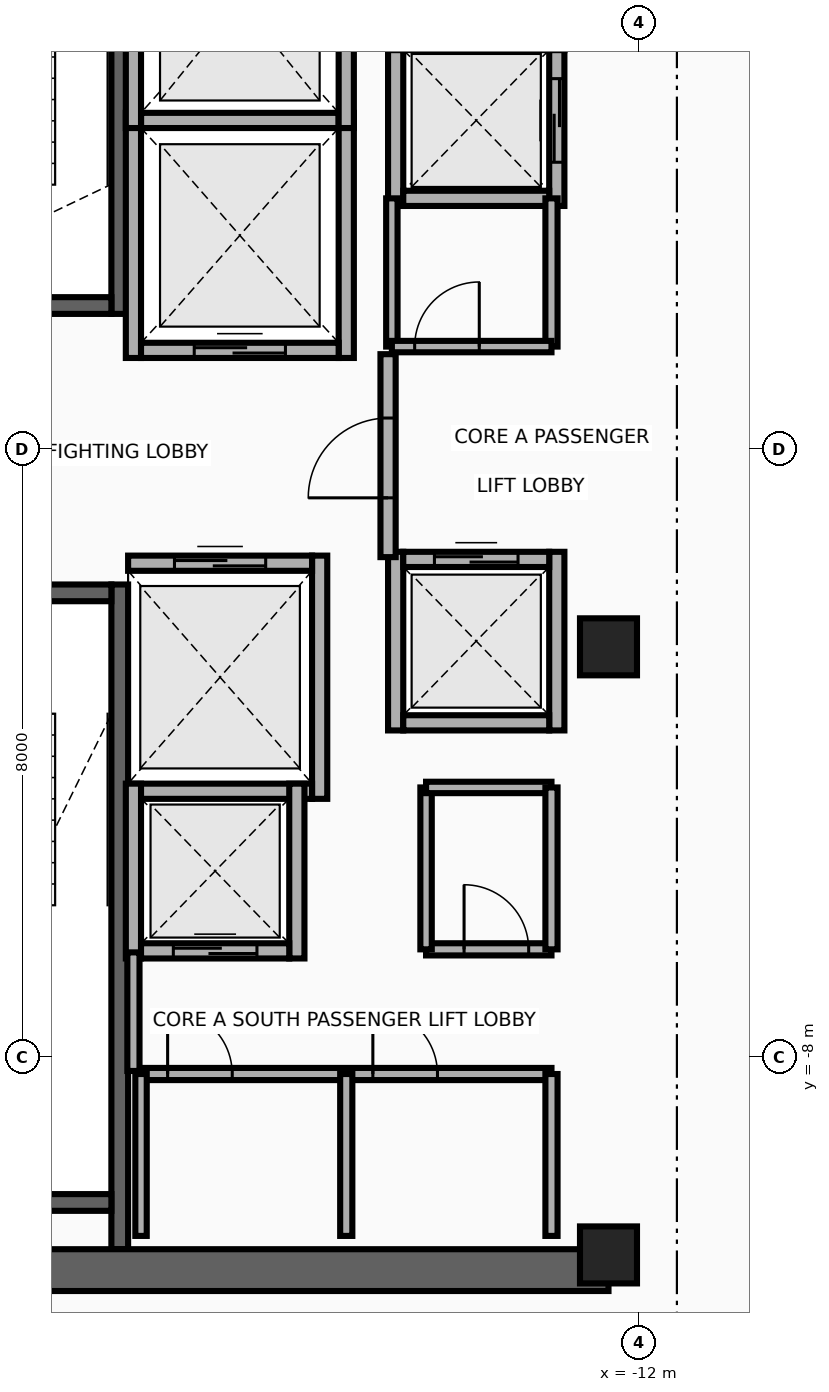
"""IFC4 building model, lengths in metres.
Left out: names, types, materials, properties, quantities, classifications, styles, units other than length and angle.
Written with IfcOpenShell. Run it as: python <this file> out.ifc"""

import sys

from ifc_helpers import new_model, si_unit, direction, frame, frame_2d, origin, origin_2d, place, context, subcontext, project, spatial, rectangle, extrude, source, transform, mapped, element, fill, save


model = new_model("IFC4")
c1 = context("Model", 3, precision=1e-05, world=origin(), true_north=direction((0.0, 1.0)))
c2 = subcontext(c1, "Body", "Model", "MODEL_VIEW")
j1 = project(units=[si_unit("LENGTHUNIT", "METRE"), si_unit("PLANEANGLEUNIT", "RADIAN")], contexts=[c1])
p1 = place(None, origin())
s1 = spatial("IfcSite", under=j1, at=p1, CompositionType="ELEMENT")
p2 = place(p1, origin())
s2 = spatial("IfcBuilding", under=s1, at=p2, CompositionType="ELEMENT")
p3 = place(p2, frame((0.0, 0.0, 287.0)))
s3 = spatial("IfcBuildingStorey", under=s2, at=p3, CompositionType="ELEMENT", Elevation=287.0)
p4 = place(p3, frame((-18.83, 1.78, 0.0), z_axis=(0.0, 0.0, 1.0), x_axis=(0.0, 1.0, 0.0)))
e1 = element("IfcWall", 1, at=p4, inside=s3, PredefinedType="SHEAR", context=c2, shape_type="SweptSolid", body=[
    extrude(rectangle(XDim=8.745, YDim=0.22, at=frame_2d((4.373, 0.0))), origin(), (0.0, 0.0, 1.0), 3.36),
])
p5 = place(p3, frame((-22.05, 1.89, 0.0), z_axis=(0.0, 0.0, 1.0), x_axis=(1.0, 0.0, 0.0)))
e2 = element("IfcWall", 2, at=p5, inside=s3, PredefinedType="SHEAR", context=c2, shape_type="SweptSolid", body=[
    extrude(rectangle(XDim=3.11, YDim=0.22, at=frame_2d((1.555, 0.0))), origin(), (0.0, 0.0, 1.0), 3.36),
])
p6 = place(p5, frame((1.0, 0.0, 0.0)))
e3 = element("IfcOpeningElement", 3, at=p6, cuts=e2, PredefinedType="OPENING", context=c2, shape_type="SweptSolid", body=[
    extrude(rectangle(XDim=1.1, YDim=2.15, at=frame_2d((0.55, 1.075))), frame((0.0, 0.125, 0.0), z_axis=(0.0, -1.0, 0.0), x_axis=(1.0, 0.0, 0.0)), (0.0, 0.0, 1.0), 0.25),
])
p7 = place(p3, frame((-18.83, -10.525, 0.0), z_axis=(0.0, 0.0, 1.0), x_axis=(0.0, 1.0, 0.0)))
e4 = element("IfcWall", 4, at=p7, inside=s3, PredefinedType="SHEAR", context=c2, shape_type="SweptSolid", body=[
    extrude(rectangle(XDim=8.745, YDim=0.22, at=frame_2d((4.373, 0.0))), origin(), (0.0, 0.0, 1.0), 3.36),
])
p8 = place(p3, frame((-22.05, -9.91, 0.0), z_axis=(0.0, 0.0, 1.0), x_axis=(1.0, 0.0, 0.0)))
e5 = element("IfcWall", 5, at=p8, inside=s3, PredefinedType="SHEAR", context=c2, shape_type="SweptSolid", body=[
    extrude(rectangle(XDim=3.11, YDim=0.22, at=frame_2d((1.555, 0.0))), origin(), (0.0, 0.0, 1.0), 3.36),
])
p9 = place(p3, frame((-22.05, -1.89, 0.0), z_axis=(0.0, 0.0, 1.0), x_axis=(1.0, 0.0, 0.0)))
e6 = element("IfcWall", 6, at=p9, inside=s3, PredefinedType="SHEAR", context=c2, shape_type="SweptSolid", body=[
    extrude(rectangle(XDim=3.11, YDim=0.22, at=frame_2d((1.555, 0.0))), origin(), (0.0, 0.0, 1.0), 3.36),
])
p10 = place(p9, frame((1.0, 0.0, 0.0)))
e7 = element("IfcOpeningElement", 7, at=p10, cuts=e6, PredefinedType="OPENING", context=c2, shape_type="SweptSolid", body=[
    extrude(rectangle(XDim=1.1, YDim=2.15, at=frame_2d((0.55, 1.075))), frame((0.0, 0.125, 0.0), z_axis=(0.0, -1.0, 0.0), x_axis=(1.0, 0.0, 0.0)), (0.0, 0.0, 1.0), 0.25),
])
p11 = place(p3, frame((-22.65, -10.8, 0.0), z_axis=(0.0, 0.0, 1.0), x_axis=(1.0, 0.0, 0.0)))
e8 = element("IfcWall", 8, at=p11, inside=s3, PredefinedType="SHEAR", context=c2, shape_type="SweptSolid", body=[
    extrude(rectangle(XDim=10.25, YDim=0.55, at=frame_2d((5.125, 0.0))), origin(), (0.0, 0.0, 1.0), 3.36),
])
m1 = source(origin(), c2, "Body", "SweptSolid", [
    extrude(rectangle(XDim=0.75, YDim=0.75, at=origin_2d()), origin(), (0.0, 0.0, 1.0), 3.6),
])
for number, where, z_axis, x_axis in (
    (9, (-12.4, -10.6, 0.0), (0.0, 0.0, 1.0), (1.0, 0.0, 0.0)),
    (10, (-12.4, -2.6, 0.0), (0.0, 0.0, 1.0), (1.0, 0.0, 0.0)),
):
    element("IfcColumn", number, at=place(p3, frame(where, z_axis=z_axis, x_axis=x_axis)), inside=s3, PredefinedType="COLUMN", context=c2, shape_type="MappedRepresentation", body=[
        mapped(m1, transform((0.0, 0.0, 0.0), x_axis=(1.0, 0.0, 0.0), y_axis=(0.0, 1.0, 0.0), z_axis=(0.0, 0.0, 1.0), scale=1.0)),
    ])
for number, where, z_axis, x_axis in (
    (11, (-18.65, 1.2, 0.0), (0.0, 0.0, 1.0), (0.0, 1.0, 0.0)),
    (12, (-15.85, 1.2, 0.0), (0.0, 0.0, 1.0), (0.0, 1.0, 0.0)),
):
    element("IfcWall", number, at=place(p3, frame(where, z_axis=z_axis, x_axis=x_axis)), inside=s3, PredefinedType="MOVABLE", context=c2, shape_type="SweptSolid", body=[
        extrude(rectangle(XDim=3.225, YDim=0.2, at=frame_2d((1.613, 0.0))), origin(), (0.0, 0.0, 1.0), 3.36),
    ])
p12 = place(p3, frame((-18.55, 1.3, 0.0), z_axis=(0.0, 0.0, 1.0), x_axis=(1.0, 0.0, 0.0)))
e13 = element("IfcWall", 13, at=p12, inside=s3, PredefinedType="MOVABLE", context=c2, shape_type="SweptSolid", body=[
    extrude(rectangle(XDim=2.6, YDim=0.2, at=frame_2d((1.3, 0.0))), origin(), (0.0, 0.0, 1.0), 3.36),
])
p13 = place(p12, frame((0.7, 0.0, 0.0)))
e14 = element("IfcOpeningElement", 14, at=p13, cuts=e13, PredefinedType="OPENING", context=c2, shape_type="SweptSolid", body=[
    extrude(rectangle(XDim=1.2, YDim=2.1, at=frame_2d((0.6, 1.05))), frame((0.0, 0.115, 0.0), z_axis=(0.0, -1.0, 0.0), x_axis=(1.0, 0.0, 0.0)), (0.0, 0.0, 1.0), 0.23),
])
p14 = place(p3, frame((-18.55, 4.325, 0.0), z_axis=(0.0, 0.0, 1.0), x_axis=(1.0, 0.0, 0.0)))
e15 = element("IfcWall", 15, at=p14, inside=s3, PredefinedType="MOVABLE", context=c2, shape_type="SweptSolid", body=[
    extrude(rectangle(XDim=2.6, YDim=0.2, at=frame_2d((1.3, 0.0))), origin(), (0.0, 0.0, 1.0), 3.36),
])
p15 = place(p3, frame((-16.2, -4.6, 0.0), z_axis=(0.0, 0.0, 1.0), x_axis=(0.0, 1.0, 0.0)))
e16 = element("IfcWall", 16, at=p15, inside=s3, PredefinedType="MOVABLE", context=c2, shape_type="SweptSolid", body=[
    extrude(rectangle(XDim=3.2, YDim=0.2, at=frame_2d((1.6, 0.0))), origin(), (0.0, 0.0, 1.0), 3.36),
])
p16 = place(p3, frame((-18.72, -4.5, 0.0), z_axis=(0.0, 0.0, 1.0), x_axis=(1.0, 0.0, 0.0)))
e17 = element("IfcWall", 17, at=p16, inside=s3, PredefinedType="MOVABLE", context=c2, shape_type="SweptSolid", body=[
    extrude(rectangle(XDim=2.42, YDim=0.2, at=frame_2d((1.21, 0.0))), origin(), (0.0, 0.0, 1.0), 3.36),
])
p17 = place(p3, frame((-18.72, -1.5, 0.0), z_axis=(0.0, 0.0, 1.0), x_axis=(1.0, 0.0, 0.0)))
e18 = element("IfcWall", 18, at=p17, inside=s3, PredefinedType="MOVABLE", context=c2, shape_type="SweptSolid", body=[
    extrude(rectangle(XDim=2.42, YDim=0.2, at=frame_2d((1.21, 0.0))), origin(), (0.0, 0.0, 1.0), 3.36),
])
p18 = place(p17, frame((0.61, 0.0, 0.0)))
e19 = element("IfcOpeningElement", 19, at=p18, cuts=e18, PredefinedType="OPENING", context=c2, shape_type="SweptSolid", body=[
    extrude(rectangle(XDim=1.2, YDim=2.1, at=frame_2d((0.6, 1.05))), frame((0.0, 0.115, 0.0), z_axis=(0.0, -1.0, 0.0), x_axis=(1.0, 0.0, 0.0)), (0.0, 0.0, 1.0), 0.23),
])
for number, where, z_axis, x_axis in (
    (20, (-18.65, 4.225, 0.0), (0.0, 0.0, 1.0), (0.0, 1.0, 0.0)),
    (21, (-15.85, 4.225, 0.0), (0.0, 0.0, 1.0), (0.0, 1.0, 0.0)),
):
    element("IfcWall", number, at=place(p3, frame(where, z_axis=z_axis, x_axis=x_axis)), inside=s3, PredefinedType="MOVABLE", context=c2, shape_type="SweptSolid", body=[
        extrude(rectangle(XDim=3.325, YDim=0.2, at=frame_2d((1.663, 0.0))), origin(), (0.0, 0.0, 1.0), 3.36),
    ])
p19 = place(p3, frame((-15.2, 3.2, 0.0), z_axis=(0.0, 0.0, 1.0), x_axis=(0.0, 1.0, 0.0)))
e22 = element("IfcWall", 22, at=p19, inside=s3, PredefinedType="MOVABLE", context=c2, shape_type="SweptSolid", body=[
    extrude(rectangle(XDim=2.25, YDim=0.2, at=frame_2d((1.125, 0.0))), origin(), (0.0, 0.0, 1.0), 3.36),
])
p20 = place(p3, frame((-13.08, 3.2, 0.0), z_axis=(0.0, 0.0, 1.0), x_axis=(0.0, 1.0, 0.0)))
e23 = element("IfcWall", 23, at=p20, inside=s3, PredefinedType="MOVABLE", context=c2, shape_type="SweptSolid", body=[
    extrude(rectangle(XDim=2.25, YDim=0.2, at=frame_2d((1.125, 0.0))), origin(), (0.0, 0.0, 1.0), 3.36),
])
p21 = place(p20, frame((0.575, 0.0, 0.0)))
e24 = element("IfcOpeningElement", 24, at=p21, cuts=e23, PredefinedType="OPENING", context=c2, shape_type="SweptSolid", body=[
    extrude(rectangle(XDim=1.1, YDim=2.1, at=frame_2d((0.55, 1.05))), frame((0.0, 0.115, 0.0), z_axis=(0.0, -1.0, 0.0), x_axis=(1.0, 0.0, 0.0)), (0.0, 0.0, 1.0), 0.23),
])
p22 = place(p3, frame((-15.1, 3.3, 0.0), z_axis=(0.0, 0.0, 1.0), x_axis=(1.0, 0.0, 0.0)))
e25 = element("IfcWall", 25, at=p22, inside=s3, PredefinedType="MOVABLE", context=c2, shape_type="SweptSolid", body=[
    extrude(rectangle(XDim=1.92, YDim=0.2, at=frame_2d((0.96, 0.0))), origin(), (0.0, 0.0, 1.0), 3.36),
])
for number, where, z_axis, x_axis in (
    (26, (-18.65, -6.7, 0.0), (0.0, 0.0, 1.0), (0.0, 1.0, 0.0)),
    (27, (-16.5, -6.7, 0.0), (0.0, 0.0, 1.0), (0.0, 1.0, 0.0)),
):
    element("IfcWall", number, at=place(p3, frame(where, z_axis=z_axis, x_axis=x_axis)), inside=s3, PredefinedType="MOVABLE", context=c2, shape_type="SweptSolid", body=[
        extrude(rectangle(XDim=2.3, YDim=0.2, at=frame_2d((1.15, 0.0))), origin(), (0.0, 0.0, 1.0), 3.36),
    ])
p23 = place(p3, frame((-18.55, -6.6, 0.0), z_axis=(0.0, 0.0, 1.0), x_axis=(1.0, 0.0, 0.0)))
e28 = element("IfcWall", 28, at=p23, inside=s3, PredefinedType="MOVABLE", context=c2, shape_type="SweptSolid", body=[
    extrude(rectangle(XDim=1.95, YDim=0.2, at=frame_2d((0.975, 0.0))), origin(), (0.0, 0.0, 1.0), 3.36),
])
p24 = place(p23, frame((0.425, 0.0, 0.0)))
e29 = element("IfcOpeningElement", 29, at=p24, cuts=e28, PredefinedType="OPENING", context=c2, shape_type="SweptSolid", body=[
    extrude(rectangle(XDim=1.1, YDim=2.1, at=frame_2d((0.55, 1.05))), frame((0.0, 0.115, 0.0), z_axis=(0.0, -1.0, 0.0), x_axis=(1.0, 0.0, 0.0)), (0.0, 0.0, 1.0), 0.23),
])
for number, where, z_axis, x_axis in (
    (30, (-15.2, -3.7, 0.0), (0.0, 0.0, 1.0), (0.0, 1.0, 0.0)),
    (31, (-13.08, -3.7, 0.0), (0.0, 0.0, 1.0), (0.0, 1.0, 0.0)),
):
    element("IfcWall", number, at=place(p3, frame(where, z_axis=z_axis, x_axis=x_axis)), inside=s3, PredefinedType="MOVABLE", context=c2, shape_type="SweptSolid", body=[
        extrude(rectangle(XDim=2.35, YDim=0.2, at=frame_2d((1.175, 0.0))), origin(), (0.0, 0.0, 1.0), 3.36),
    ])
p25 = place(p3, frame((-15.1, -3.6, 0.0), z_axis=(0.0, 0.0, 1.0), x_axis=(1.0, 0.0, 0.0)))
e32 = element("IfcWall", 32, at=p25, inside=s3, PredefinedType="MOVABLE", context=c2, shape_type="SweptSolid", body=[
    extrude(rectangle(XDim=1.92, YDim=0.2, at=frame_2d((0.96, 0.0))), origin(), (0.0, 0.0, 1.0), 3.36),
])
p26 = place(p3, frame((-15.1, -1.45, 0.0), z_axis=(0.0, 0.0, 1.0), x_axis=(1.0, 0.0, 0.0)))
e33 = element("IfcWall", 33, at=p26, inside=s3, PredefinedType="MOVABLE", context=c2, shape_type="SweptSolid", body=[
    extrude(rectangle(XDim=1.92, YDim=0.2, at=frame_2d((0.96, 0.0))), origin(), (0.0, 0.0, 1.0), 3.36),
])
p27 = place(p26, frame((0.41, 0.0, 0.0)))
e34 = element("IfcOpeningElement", 34, at=p27, cuts=e33, PredefinedType="OPENING", context=c2, shape_type="SweptSolid", body=[
    extrude(rectangle(XDim=1.1, YDim=2.1, at=frame_2d((0.55, 1.05))), frame((0.0, 0.115, 0.0), z_axis=(0.0, -1.0, 0.0), x_axis=(1.0, 0.0, 0.0)), (0.0, 0.0, 1.0), 0.23),
])
p28 = place(p3, frame((-15.3, -1.42, 0.0), z_axis=(0.0, 0.0, 1.0), x_axis=(0.0, 1.0, 0.0)))
e35 = element("IfcWall", 35, at=p28, inside=s3, PredefinedType="PARTITIONING", context=c2, shape_type="SweptSolid", body=[
    extrude(rectangle(XDim=2.67, YDim=0.2, at=frame_2d((1.335, 0.0))), origin(), (0.0, 0.0, 1.0), 3.36),
])
p29 = place(p28, frame((0.78, 0.0, 0.0)))
e36 = element("IfcOpeningElement", 36, at=p29, cuts=e35, PredefinedType="OPENING", context=c2, shape_type="SweptSolid", body=[
    extrude(rectangle(XDim=1.05, YDim=2.15, at=frame_2d((0.525, 1.075))), frame((0.0, 0.115, 0.0), z_axis=(0.0, -1.0, 0.0), x_axis=(1.0, 0.0, 0.0)), (0.0, 0.0, 1.0), 0.23),
])
p30 = place(p3, frame((-18.65, -8.18, 0.0), z_axis=(0.0, 0.0, 1.0), x_axis=(0.0, 1.0, 0.0)))
e37 = element("IfcWall", 37, at=p30, inside=s3, PredefinedType="PARTITIONING", context=c2, shape_type="SweptSolid", body=[
    extrude(rectangle(XDim=1.56, YDim=0.16, at=frame_2d((0.78, 0.0))), origin(), (0.0, 0.0, 1.0), 3.36),
])
p31 = place(p3, frame((-18.55, -8.22, 0.0), z_axis=(0.0, 0.0, 1.0), x_axis=(1.0, 0.0, 0.0)))
e38 = element("IfcWall", 38, at=p31, inside=s3, PredefinedType="PARTITIONING", context=c2, shape_type="SweptSolid", body=[
    extrude(rectangle(XDim=5.4, YDim=0.16, at=frame_2d((2.7, 0.0))), origin(), (0.0, 0.0, 1.0), 3.36),
])
p32 = place(p31, frame((0.35, 0.0, 0.0)))
e39 = element("IfcOpeningElement", 39, at=p32, cuts=e38, PredefinedType="OPENING", context=c2, shape_type="SweptSolid", body=[
    extrude(rectangle(XDim=0.85, YDim=2.05, at=frame_2d((0.425, 1.025))), frame((0.0, 0.095, 0.0), z_axis=(0.0, -1.0, 0.0), x_axis=(1.0, 0.0, 0.0)), (0.0, 0.0, 1.0), 0.19),
])
p33 = place(p31, frame((3.05, 0.0, 0.0)))
e40 = element("IfcOpeningElement", 40, at=p33, cuts=e38, PredefinedType="OPENING", context=c2, shape_type="SweptSolid", body=[
    extrude(rectangle(XDim=0.85, YDim=2.05, at=frame_2d((0.425, 1.025))), frame((0.0, 0.095, 0.0), z_axis=(0.0, -1.0, 0.0), x_axis=(1.0, 0.0, 0.0)), (0.0, 0.0, 1.0), 0.19),
])
p34 = place(p3, frame((-18.55, -10.35, 0.0), z_axis=(0.0, 0.0, 1.0), x_axis=(0.0, 1.0, 0.0)))
e41 = element("IfcWall", 41, at=p34, inside=s3, PredefinedType="PARTITIONING", context=c2, shape_type="SweptSolid", body=[
    extrude(rectangle(XDim=2.13, YDim=0.15, at=frame_2d((1.065, 0.0))), origin(), (0.0, 0.0, 1.0), 3.36),
])
for number, where, z_axis, x_axis in (
    (42, (-13.15, -10.35, 0.0), (0.0, 0.0, 1.0), (0.0, 1.0, 0.0)),
    (43, (-15.85, -10.35, 0.0), (0.0, 0.0, 1.0), (0.0, 1.0, 0.0)),
):
    element("IfcWall", number, at=place(p3, frame(where, z_axis=z_axis, x_axis=x_axis)), inside=s3, PredefinedType="PARTITIONING", context=c2, shape_type="SweptSolid", body=[
        extrude(rectangle(XDim=2.13, YDim=0.16, at=frame_2d((1.065, 0.0))), origin(), (0.0, 0.0, 1.0), 3.36),
    ])
p35 = place(p3, frame((-14.8, -6.58, 0.0), z_axis=(0.0, 0.0, 1.0), x_axis=(1.0, 0.0, 0.0)))
e44 = element("IfcWall", 44, at=p35, inside=s3, PredefinedType="PARTITIONING", context=c2, shape_type="SweptSolid", body=[
    extrude(rectangle(XDim=1.65, YDim=0.16, at=frame_2d((0.825, 0.0))), origin(), (0.0, 0.0, 1.0), 3.36),
])
p36 = place(p35, frame((0.5, 0.0, 0.0)))
e45 = element("IfcOpeningElement", 45, at=p36, cuts=e44, PredefinedType="OPENING", context=c2, shape_type="SweptSolid", body=[
    extrude(rectangle(XDim=0.85, YDim=2.05, at=frame_2d((0.425, 1.025))), frame((0.0, 0.095, 0.0), z_axis=(0.0, -1.0, 0.0), x_axis=(1.0, 0.0, 0.0)), (0.0, 0.0, 1.0), 0.19),
])
p37 = place(p3, frame((-14.8, -6.58, 0.0), z_axis=(0.0, 0.0, 1.0), x_axis=(0.0, 1.0, 0.0)))
e46 = element("IfcWall", 46, at=p37, inside=s3, PredefinedType="PARTITIONING", context=c2, shape_type="SweptSolid", body=[
    extrude(rectangle(XDim=2.13, YDim=0.15, at=frame_2d((1.065, 0.0))), origin(), (0.0, 0.0, 1.0), 3.36),
])
p38 = place(p3, frame((-14.8, -4.45, 0.0), z_axis=(0.0, 0.0, 1.0), x_axis=(1.0, 0.0, 0.0)))
e47 = element("IfcWall", 47, at=p38, inside=s3, PredefinedType="PARTITIONING", context=c2, shape_type="SweptSolid", body=[
    extrude(rectangle(XDim=1.65, YDim=0.15, at=frame_2d((0.825, 0.0))), origin(), (0.0, 0.0, 1.0), 3.36),
])
p39 = place(p3, frame((-13.15, -6.58, 0.0), z_axis=(0.0, 0.0, 1.0), x_axis=(0.0, 1.0, 0.0)))
e48 = element("IfcWall", 48, at=p39, inside=s3, PredefinedType="PARTITIONING", context=c2, shape_type="SweptSolid", body=[
    extrude(rectangle(XDim=2.13, YDim=0.16, at=frame_2d((1.065, 0.0))), origin(), (0.0, 0.0, 1.0), 3.36),
])
p40 = place(p3, frame((-13.15, 1.35, 0.0), z_axis=(0.0, 0.0, 1.0), x_axis=(0.0, 1.0, 0.0)))
e49 = element("IfcWall", 49, at=p40, inside=s3, PredefinedType="PARTITIONING", context=c2, shape_type="SweptSolid", body=[
    extrude(rectangle(XDim=1.95, YDim=0.16, at=frame_2d((0.975, 0.0))), origin(), (0.0, 0.0, 1.0), 3.36),
])
p41 = place(p3, frame((-15.25, 1.35, 0.0), z_axis=(0.0, 0.0, 1.0), x_axis=(0.0, 1.0, 0.0)))
e50 = element("IfcWall", 50, at=p41, inside=s3, PredefinedType="PARTITIONING", context=c2, shape_type="SweptSolid", body=[
    extrude(rectangle(XDim=1.95, YDim=0.15, at=frame_2d((0.975, 0.0))), origin(), (0.0, 0.0, 1.0), 3.36),
])
p42 = place(p3, frame((-15.25, 1.35, 0.0), z_axis=(0.0, 0.0, 1.0), x_axis=(1.0, 0.0, 0.0)))
e51 = element("IfcWall", 51, at=p42, inside=s3, PredefinedType="PARTITIONING", context=c2, shape_type="SweptSolid", body=[
    extrude(rectangle(XDim=2.1, YDim=0.15, at=frame_2d((1.05, 0.0))), origin(), (0.0, 0.0, 1.0), 3.36),
])
p43 = place(p42, frame((0.3, 0.0, 0.0)))
e52 = element("IfcOpeningElement", 52, at=p43, cuts=e51, PredefinedType="OPENING", context=c2, shape_type="SweptSolid", body=[
    extrude(rectangle(XDim=0.85, YDim=2.05, at=frame_2d((0.425, 1.025))), frame((0.0, 0.09, 0.0), z_axis=(0.0, -1.0, 0.0), x_axis=(1.0, 0.0, 0.0)), (0.0, 0.0, 1.0), 0.18),
])
p44 = place(p13, origin())
e53 = element("IfcDoor", 53, at=p44, inside=s3, OperationType="DOUBLE_DOOR_SLIDING", PredefinedType="DOOR", context=c2, shape_type="SweptSolid", body=[
    extrude(rectangle(XDim=1.2, YDim=2.1, at=frame_2d((0.6, 1.05))), frame((0.0, 0.025, 0.0), z_axis=(0.0, -1.0, 0.0), x_axis=(1.0, 0.0, 0.0)), (0.0, 0.0, 1.0), 0.05),
])
fill(e14, e53)
p45 = place(p18, origin())
e54 = element("IfcDoor", 54, at=p45, inside=s3, OperationType="DOUBLE_DOOR_SLIDING", PredefinedType="DOOR", context=c2, shape_type="SweptSolid", body=[
    extrude(rectangle(XDim=1.2, YDim=2.1, at=frame_2d((0.6, 1.05))), frame((0.0, 0.025, 0.0), z_axis=(0.0, -1.0, 0.0), x_axis=(1.0, 0.0, 0.0)), (0.0, 0.0, 1.0), 0.05),
])
fill(e19, e54)
p46 = place(p21, origin())
e55 = element("IfcDoor", 55, at=p46, inside=s3, OperationType="DOUBLE_DOOR_SLIDING", PredefinedType="DOOR", context=c2, shape_type="SweptSolid", body=[
    extrude(rectangle(XDim=1.1, YDim=2.1, at=frame_2d((0.55, 1.05))), frame((0.0, 0.025, 0.0), z_axis=(0.0, -1.0, 0.0), x_axis=(1.0, 0.0, 0.0)), (0.0, 0.0, 1.0), 0.05),
])
fill(e24, e55)
p47 = place(p24, origin())
e56 = element("IfcDoor", 56, at=p47, inside=s3, OperationType="DOUBLE_DOOR_SLIDING", PredefinedType="DOOR", context=c2, shape_type="SweptSolid", body=[
    extrude(rectangle(XDim=1.1, YDim=2.1, at=frame_2d((0.55, 1.05))), frame((0.0, 0.025, 0.0), z_axis=(0.0, -1.0, 0.0), x_axis=(1.0, 0.0, 0.0)), (0.0, 0.0, 1.0), 0.05),
])
fill(e29, e56)
p48 = place(p27, origin())
e57 = element("IfcDoor", 57, at=p48, inside=s3, OperationType="DOUBLE_DOOR_SLIDING", PredefinedType="DOOR", context=c2, shape_type="SweptSolid", body=[
    extrude(rectangle(XDim=1.1, YDim=2.1, at=frame_2d((0.55, 1.05))), frame((0.0, 0.025, 0.0), z_axis=(0.0, -1.0, 0.0), x_axis=(1.0, 0.0, 0.0)), (0.0, 0.0, 1.0), 0.05),
])
fill(e34, e57)
p49 = place(p29, origin())
e58 = element("IfcDoor", 58, at=p49, inside=s3, OperationType="SINGLE_SWING_RIGHT", PredefinedType="DOOR", context=c2, shape_type="SweptSolid", body=[
    extrude(rectangle(XDim=1.05, YDim=2.15, at=frame_2d((0.525, 1.075))), frame((0.0, 0.025, 0.0), z_axis=(0.0, -1.0, 0.0), x_axis=(1.0, 0.0, 0.0)), (0.0, 0.0, 1.0), 0.05),
])
fill(e36, e58)
p50 = place(p32, origin())
e59 = element("IfcDoor", 59, at=p50, inside=s3, OperationType="SINGLE_SWING_LEFT", PredefinedType="DOOR", context=c2, shape_type="SweptSolid", body=[
    extrude(rectangle(XDim=0.85, YDim=2.05, at=frame_2d((0.425, 1.025))), frame((0.0, 0.025, 0.0), z_axis=(0.0, -1.0, 0.0), x_axis=(1.0, 0.0, 0.0)), (0.0, 0.0, 1.0), 0.05),
])
fill(e39, e59)
p51 = place(p33, origin())
e60 = element("IfcDoor", 60, at=p51, inside=s3, OperationType="SINGLE_SWING_RIGHT", PredefinedType="DOOR", context=c2, shape_type="SweptSolid", body=[
    extrude(rectangle(XDim=0.85, YDim=2.05, at=frame_2d((0.425, 1.025))), frame((0.0, 0.025, 0.0), z_axis=(0.0, -1.0, 0.0), x_axis=(1.0, 0.0, 0.0)), (0.0, 0.0, 1.0), 0.05),
])
fill(e40, e60)
p52 = place(p36, origin())
e61 = element("IfcDoor", 61, at=p52, inside=s3, OperationType="SINGLE_SWING_LEFT", PredefinedType="DOOR", context=c2, shape_type="SweptSolid", body=[
    extrude(rectangle(XDim=0.85, YDim=2.05, at=frame_2d((0.425, 1.025))), frame((0.0, 0.025, 0.0), z_axis=(0.0, -1.0, 0.0), x_axis=(1.0, 0.0, 0.0)), (0.0, 0.0, 1.0), 0.05),
])
fill(e45, e61)
p53 = place(p43, origin())
e62 = element("IfcDoor", 62, at=p53, inside=s3, OperationType="SINGLE_SWING_RIGHT", PredefinedType="DOOR", context=c2, shape_type="SweptSolid", body=[
    extrude(rectangle(XDim=0.85, YDim=2.05, at=frame_2d((0.425, 1.025))), frame((0.0, 0.025, 0.0), z_axis=(0.0, -1.0, 0.0), x_axis=(1.0, 0.0, 0.0)), (0.0, 0.0, 1.0), 0.05),
])
fill(e52, e62)
save(model, sys.argv[1])
